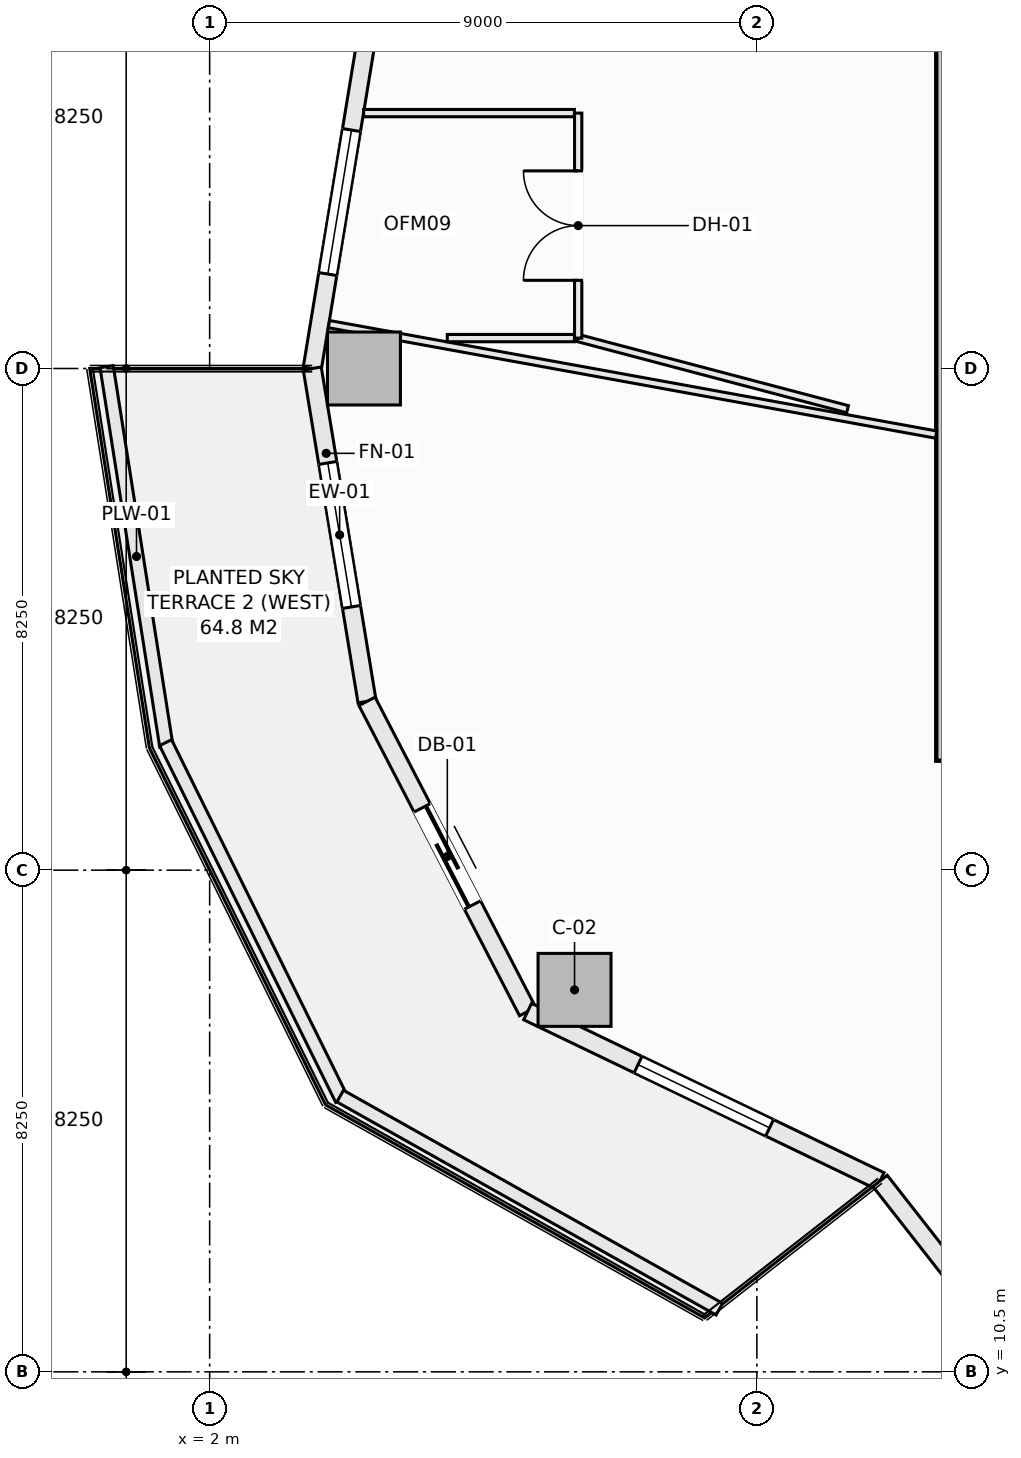
"""IFC4 building model, lengths in metres.
Left out: names, types, materials, properties, quantities, classifications, styles, units other than length and angle.
Written with IfcOpenShell. Run it as: python <this file> out.ifc"""

import sys

from ifc_helpers import new_model, si_unit, direction, frame, frame_2d, origin, origin_2d, place, context, subcontext, project, spatial, rectangle, extrude, element, fill, save


model = new_model("IFC4")
c1 = context("Model", 3, precision=1e-05, world=origin(), true_north=direction((0.0, 1.0)))
c2 = subcontext(c1, "Body", "Model", "MODEL_VIEW")
j1 = project(units=[si_unit("LENGTHUNIT", "METRE"), si_unit("PLANEANGLEUNIT", "RADIAN")], contexts=[c1])
p1 = place(None, origin())
s1 = spatial("IfcSite", under=j1, at=p1, CompositionType="ELEMENT")
p2 = place(p1, origin())
s2 = spatial("IfcBuilding", under=s1, at=p2, CompositionType="ELEMENT")
p3 = place(p2, frame((0.0, 0.0, 65.0)))
s3 = spatial("IfcBuildingStorey", under=s2, at=p3, CompositionType="ELEMENT", Elevation=65.0)
p4 = place(p3, frame((14.375, 20.55, -0.28), z_axis=(0.0, 0.0, 1.0), x_axis=(0.0, 1.0, 0.0)))
e1 = element("IfcWall", 1, at=p4, inside=s3, PredefinedType="SHEAR", context=c2, shape_type="SweptSolid", body=[
    extrude(rectangle(XDim=12.9, YDim=0.85, at=frame_2d((6.45, 0.0))), origin(), (0.0, 0.0, 1.0), 3.85),
])
for number, where, z_axis, x_axis in (
    (2, (4.538, 27.0, -0.28), (0.0, 0.0, 1.0), (1.0, 0.0, 0.0)),
    (3, (8.001, 16.781, -0.28), (0.0, 0.0, 1.0), (1.0, 0.0, 0.0)),
):
    element("IfcColumn", number, at=place(p3, frame(where, z_axis=z_axis, x_axis=x_axis)), inside=s3, PredefinedType="COLUMN", context=c2, shape_type="SweptSolid", body=[
        extrude(rectangle(XDim=1.2, YDim=1.2, at=origin_2d()), origin(), (0.0, 0.0, 1.0), 3.85),
    ])
p5 = place(p3, frame((3.688, 27.0, 0.0), z_axis=(0.0, 0.0, 1.0), x_axis=(0.162386212206, 0.986727276447, 0.0)))
e4 = element("IfcWall", 4, at=p5, inside=s3, PredefinedType="SOLIDWALL", context=c2, shape_type="SweptSolid", body=[
    extrude(rectangle(XDim=5.548, YDim=0.3, at=frame_2d((2.774, 0.0))), origin(), (0.0, 0.0, 1.0), 3.093),
])
p6 = place(p5, frame((1.574, 0.0, 0.85)))
e5 = element("IfcOpeningElement", 5, at=p6, cuts=e4, PredefinedType="OPENING", context=c2, shape_type="SweptSolid", body=[
    extrude(rectangle(XDim=2.4, YDim=1.9, at=frame_2d((1.2, 0.95))), frame((0.0, 0.16, 0.0), z_axis=(0.0, -1.0, 0.0), x_axis=(1.0, 0.0, 0.0)), (0.0, 0.0, 1.0), 0.32),
])
p7 = place(p3, frame((3.688, 27.0, 0.0), z_axis=(0.0, 0.0, 1.0), x_axis=(0.162386212206, -0.986727276447, 0.0)))
e6 = element("IfcWall", 6, at=p7, inside=s3, PredefinedType="SOLIDWALL", context=c2, shape_type="SweptSolid", body=[
    extrude(rectangle(XDim=5.548, YDim=0.3, at=frame_2d((2.774, 0.0))), origin(), (0.0, 0.0, 1.0), 3.093),
])
p8 = place(p7, frame((1.574, 0.0, 0.85)))
e7 = element("IfcOpeningElement", 7, at=p8, cuts=e6, PredefinedType="OPENING", context=c2, shape_type="SweptSolid", body=[
    extrude(rectangle(XDim=2.4, YDim=1.9, at=frame_2d((1.2, 0.95))), frame((0.0, 0.16, 0.0), z_axis=(0.0, -1.0, 0.0), x_axis=(1.0, 0.0, 0.0)), (0.0, 0.0, 1.0), 0.32),
])
p9 = place(p3, frame((4.588, 21.526, 0.0), z_axis=(0.0, 0.0, 1.0), x_axis=(0.459800981414, -0.888021991558, 0.0)))
e8 = element("IfcWall", 8, at=p9, inside=s3, PredefinedType="SOLIDWALL", context=c2, shape_type="SweptSolid", body=[
    extrude(rectangle(XDim=5.744, YDim=0.3, at=frame_2d((2.872, 0.0))), origin(), (0.0, 0.0, 1.0), 3.093),
])
p10 = place(p9, frame((1.972, 0.0, 0.0)))
e9 = element("IfcOpeningElement", 9, at=p10, cuts=e8, PredefinedType="OPENING", context=c2, shape_type="SweptSolid", body=[
    extrude(rectangle(XDim=1.8, YDim=2.25, at=frame_2d((0.9, 1.125))), frame((0.0, 0.16, 0.0), z_axis=(0.0, -1.0, 0.0), x_axis=(1.0, 0.0, 0.0)), (0.0, 0.0, 1.0), 0.32),
])
p11 = place(p3, frame((7.229, 16.425, 0.0), z_axis=(0.0, 0.0, 1.0), x_axis=(0.901354747727, -0.433081538224, 0.0)))
e10 = element("IfcWall", 10, at=p11, inside=s3, PredefinedType="SOLIDWALL", context=c2, shape_type="SweptSolid", body=[
    extrude(rectangle(XDim=6.431, YDim=0.3, at=frame_2d((3.215, 0.0))), origin(), (0.0, 0.0, 1.0), 3.093),
])
p12 = place(p11, frame((2.015, 0.0, 0.85)))
e11 = element("IfcOpeningElement", 11, at=p12, cuts=e10, PredefinedType="OPENING", context=c2, shape_type="SweptSolid", body=[
    extrude(rectangle(XDim=2.4, YDim=1.9, at=frame_2d((1.2, 0.95))), frame((0.0, 0.16, 0.0), z_axis=(0.0, -1.0, 0.0), x_axis=(1.0, 0.0, 0.0)), (0.0, 0.0, 1.0), 0.32),
])
p13 = place(p3, frame((13.026, 13.64, 0.0), z_axis=(0.0, 0.0, 1.0), x_axis=(0.616434798832, -0.78740595552, 0.0)))
e12 = element("IfcWall", 12, at=p13, inside=s3, PredefinedType="SOLIDWALL", context=c2, shape_type="SweptSolid", body=[
    extrude(rectangle(XDim=6.294, YDim=0.3, at=frame_2d((3.147, 0.0))), origin(), (0.0, 0.0, 1.0), 3.093),
])
p14 = place(p13, frame((1.947, 0.0, 0.85)))
e13 = element("IfcOpeningElement", 13, at=p14, cuts=e12, PredefinedType="OPENING", context=c2, shape_type="SweptSolid", body=[
    extrude(rectangle(XDim=2.4, YDim=1.9, at=frame_2d((1.2, 0.95))), frame((0.0, 0.16, 0.0), z_axis=(0.0, -1.0, 0.0), x_axis=(1.0, 0.0, 0.0)), (0.0, 0.0, 1.0), 0.32),
])
p15 = place(p3, frame((0.306, 27.029, 0.0), z_axis=(0.0, 0.0, 1.0), x_axis=(0.15545655238, -0.987842730561, 0.0)))
e14 = element("IfcWall", 14, at=p15, inside=s3, PredefinedType="PARAPET", context=c2, shape_type="SweptSolid", body=[
    extrude(rectangle(XDim=6.318, YDim=0.22, at=frame_2d((3.159, 0.0))), origin(), (0.0, 0.0, 1.0), 0.52),
])
p16 = place(p3, frame((1.275, 20.847, 0.0), z_axis=(0.0, 0.0, 1.0), x_axis=(0.442686636348, -0.89667638644, 0.0)))
e15 = element("IfcWall", 15, at=p16, inside=s3, PredefinedType="PARAPET", context=c2, shape_type="SweptSolid", body=[
    extrude(rectangle(XDim=6.545, YDim=0.22, at=frame_2d((3.272, 0.0))), origin(), (0.0, 0.0, 1.0), 0.52),
])
p17 = place(p3, frame((4.147, 15.034, 0.0), z_axis=(0.0, 0.0, 1.0), x_axis=(0.871775109335, -0.489906275468, 0.0)))
e16 = element("IfcWall", 16, at=p17, inside=s3, PredefinedType="PARAPET", context=c2, shape_type="SweptSolid", body=[
    extrude(rectangle(XDim=7.152, YDim=0.22, at=frame_2d((3.576, 0.0))), origin(), (0.0, 0.0, 1.0), 0.52),
])
p18 = place(p3, frame((3.962, 27.73, 0.0), z_axis=(0.0, 0.0, 1.0), x_axis=(0.983849121981, -0.178999735131, 0.0)))
e17 = element("IfcWall", 17, at=p18, inside=s3, PredefinedType="PARTITIONING", context=c2, shape_type="SweptSolid", body=[
    extrude(rectangle(XDim=10.15, YDim=0.12, at=frame_2d((5.075, 0.0))), origin(), (0.0, 0.0, 1.0), 2.934),
])
p19 = place(p3, frame((8.061, 27.5, 0.0), z_axis=(0.0, 0.0, 1.0), x_axis=(0.96688100249, -0.255227598475, 0.0)))
e18 = element("IfcWall", 18, at=p19, inside=s3, PredefinedType="PARTITIONING", context=c2, shape_type="SweptSolid", body=[
    extrude(rectangle(XDim=4.582, YDim=0.12, at=frame_2d((2.291, 0.0))), origin(), (0.0, 0.0, 1.0), 2.934),
])
p20 = place(p3, frame((8.061, 27.5, 0.0), z_axis=(0.0, 0.0, 1.0), x_axis=(0.0, 1.0, 0.0)))
e19 = element("IfcWall", 19, at=p20, inside=s3, PredefinedType="PARTITIONING", context=c2, shape_type="SweptSolid", body=[
    extrude(rectangle(XDim=3.7, YDim=0.12, at=frame_2d((1.85, 0.0))), origin(), (0.0, 0.0, 1.0), 3.57),
])
p21 = place(p20, frame((0.95, 0.0, 0.0)))
e20 = element("IfcOpeningElement", 20, at=p21, cuts=e19, PredefinedType="OPENING", context=c2, shape_type="SweptSolid", body=[
    extrude(rectangle(XDim=1.8, YDim=2.3, at=frame_2d((0.9, 1.15))), frame((0.0, 0.07, 0.0), z_axis=(0.0, -1.0, 0.0), x_axis=(1.0, 0.0, 0.0)), (0.0, 0.0, 1.0), 0.14),
])
p22 = place(p3, frame((4.533, 31.2, 0.0), z_axis=(0.0, 0.0, 1.0), x_axis=(1.0, 0.0, 0.0)))
e21 = element("IfcWall", 21, at=p22, inside=s3, PredefinedType="PARTITIONING", context=c2, shape_type="SweptSolid", body=[
    extrude(rectangle(XDim=3.466, YDim=0.12, at=frame_2d((1.733, 0.0))), origin(), (0.0, 0.0, 1.0), 3.57),
])
p23 = place(p3, frame((5.908, 27.5, 0.0), z_axis=(0.0, 0.0, 1.0), x_axis=(1.0, 0.0, 0.0)))
e22 = element("IfcWall", 22, at=p23, inside=s3, PredefinedType="PARTITIONING", context=c2, shape_type="SweptSolid", body=[
    extrude(rectangle(XDim=2.091, YDim=0.12, at=frame_2d((1.045, 0.0))), origin(), (0.0, 0.0, 1.0), 3.57),
])
p24 = place(p6, origin())
e23 = element("IfcWindow", 23, at=p24, inside=s3, PartitioningType="SINGLE_PANEL", PredefinedType="WINDOW", context=c2, shape_type="SweptSolid", body=[
    extrude(rectangle(XDim=2.4, YDim=1.9, at=frame_2d((1.2, 0.95))), frame((0.0, 0.03, 0.0), z_axis=(0.0, -1.0, 0.0), x_axis=(1.0, 0.0, 0.0)), (0.0, 0.0, 1.0), 0.06),
])
fill(e5, e23)
p25 = place(p8, origin())
e24 = element("IfcWindow", 24, at=p25, inside=s3, PartitioningType="SINGLE_PANEL", PredefinedType="WINDOW", context=c2, shape_type="SweptSolid", body=[
    extrude(rectangle(XDim=2.4, YDim=1.9, at=frame_2d((1.2, 0.95))), frame((0.0, 0.03, 0.0), z_axis=(0.0, -1.0, 0.0), x_axis=(1.0, 0.0, 0.0)), (0.0, 0.0, 1.0), 0.06),
])
fill(e7, e24)
p26 = place(p10, frame((1.8, 0.0, 0.0), z_axis=(0.0, 0.0, 1.0), x_axis=(-1.0, 0.0, 0.0)))
e25 = element("IfcDoor", 25, at=p26, inside=s3, OperationType="SLIDING_TO_LEFT", PredefinedType="DOOR", context=c2, shape_type="SweptSolid", body=[
    extrude(rectangle(XDim=1.8, YDim=2.25, at=frame_2d((0.9, 1.125))), frame((0.0, 0.025, 0.0), z_axis=(0.0, -1.0, 0.0), x_axis=(1.0, 0.0, 0.0)), (0.0, 0.0, 1.0), 0.05),
])
fill(e9, e25)
p27 = place(p12, origin())
e26 = element("IfcWindow", 26, at=p27, inside=s3, PartitioningType="SINGLE_PANEL", PredefinedType="WINDOW", context=c2, shape_type="SweptSolid", body=[
    extrude(rectangle(XDim=2.4, YDim=1.9, at=frame_2d((1.2, 0.95))), frame((0.0, 0.03, 0.0), z_axis=(0.0, -1.0, 0.0), x_axis=(1.0, 0.0, 0.0)), (0.0, 0.0, 1.0), 0.06),
])
fill(e11, e26)
p28 = place(p21, origin())
e27 = element("IfcDoor", 27, at=p28, inside=s3, OperationType="DOUBLE_DOOR_SINGLE_SWING", PredefinedType="DOOR", context=c2, shape_type="SweptSolid", body=[
    extrude(rectangle(XDim=1.8, YDim=2.3, at=frame_2d((0.9, 1.15))), frame((0.0, 0.025, 0.0), z_axis=(0.0, -1.0, 0.0), x_axis=(1.0, 0.0, 0.0)), (0.0, 0.0, 1.0), 0.05),
])
fill(e20, e27)
save(model, sys.argv[1])
